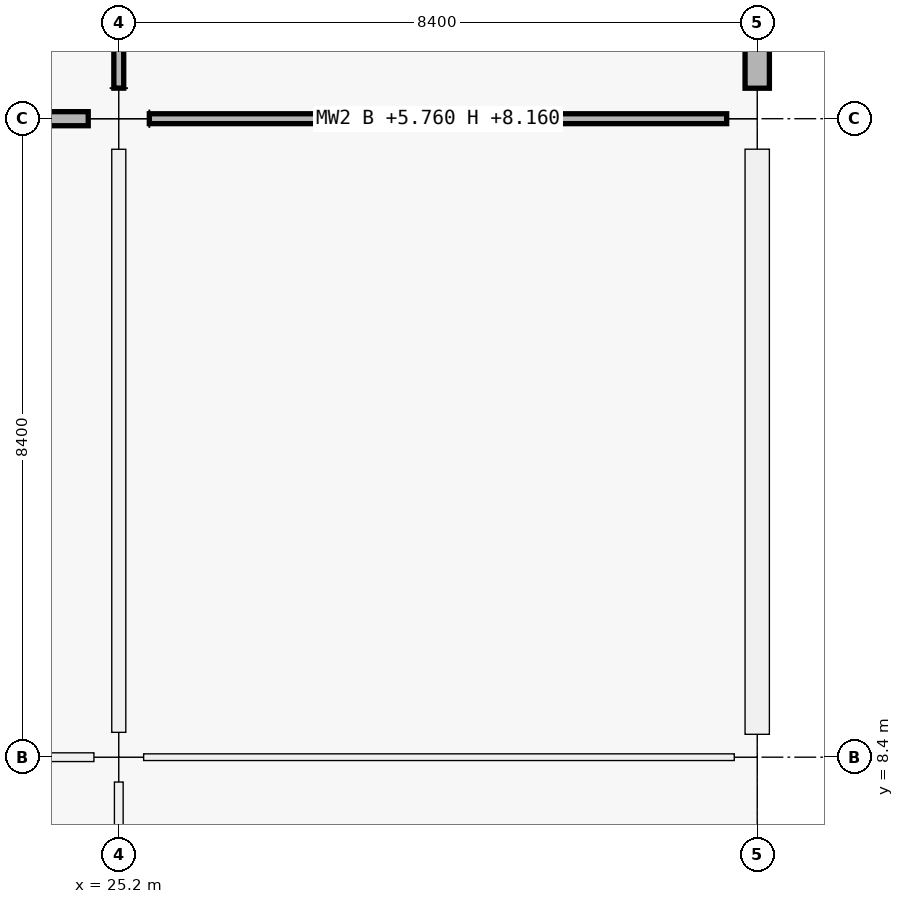
"""IFC4 building model, lengths in metres.
Left out: names, types, materials, properties, quantities, classifications, styles, units other than length and angle.
Written with IfcOpenShell. Run it as: python <this file> out.ifc"""

import sys

from ifc_helpers import new_model, si_unit, direction, frame, frame_2d, origin, origin_2d, place, context, subcontext, project, spatial, rectangle, extrude, element, fill, save


model = new_model("IFC4")
c1 = context("Model", 3, precision=1e-05, world=origin(), true_north=direction((0.0, 1.0)))
c2 = subcontext(c1, "Body", "Model", "MODEL_VIEW")
j1 = project(units=[si_unit("LENGTHUNIT", "METRE"), si_unit("PLANEANGLEUNIT", "RADIAN")], contexts=[c1])
p1 = place(None, origin())
s1 = spatial("IfcSite", under=j1, at=p1, CompositionType="ELEMENT")
p2 = place(p1, origin())
s2 = spatial("IfcBuilding", under=s1, at=p2, CompositionType="ELEMENT")
p3 = place(p2, frame((0.0, 0.0, 5.76)))
s3 = spatial("IfcBuildingStorey", under=s2, at=p3, CompositionType="ELEMENT", Elevation=5.76)
p4 = place(p3, frame((25.2, 8.4, 0.0), z_axis=(0.0, 0.0, 1.0), x_axis=(1.0, 0.0, 0.0)))
e1 = element("IfcColumn", 1, at=p4, inside=s3, PredefinedType="COLUMN", context=c2, shape_type="SweptSolid", body=[
    extrude(rectangle(XDim=0.65, YDim=0.65, at=origin_2d()), origin(), (0.0, 0.0, 1.0), 4.5),
])
p5 = place(p3, frame((25.2, 16.8, 0.0), z_axis=(0.0, 0.0, 1.0), x_axis=(1.0, 0.0, 0.0)))
e2 = element("IfcColumn", 2, at=p5, inside=s3, PredefinedType="COLUMN", context=c2, shape_type="SweptSolid", body=[
    extrude(rectangle(XDim=0.8, YDim=0.8, at=origin_2d()), origin(), (0.0, 0.0, 1.0), 4.5),
])
p6 = place(p3, frame((33.6, 8.4, 0.0), z_axis=(0.0, 0.0, 1.0), x_axis=(1.0, 0.0, 0.0)))
e3 = element("IfcColumn", 3, at=p6, inside=s3, PredefinedType="COLUMN", context=c2, shape_type="SweptSolid", body=[
    extrude(rectangle(XDim=0.6, YDim=0.6, at=origin_2d()), origin(), (0.0, 0.0, 1.0), 4.5),
])
p7 = place(p3, frame((33.6, 16.8, 0.0), z_axis=(0.0, 0.0, 1.0), x_axis=(1.0, 0.0, 0.0)))
e4 = element("IfcColumn", 4, at=p7, inside=s3, PredefinedType="COLUMN", context=c2, shape_type="SweptSolid", body=[
    extrude(rectangle(XDim=0.8, YDim=0.8, at=origin_2d()), origin(), (0.0, 0.0, 1.0), 4.5),
])
p8 = place(p3, frame((33.6, 16.399, 0.0), z_axis=(0.0, 0.0, 1.0), x_axis=(0.0, -1.0, 0.0)))
e5 = element("IfcWall", 5, at=p8, inside=s3, PredefinedType="SOLIDWALL", context=c2, shape_type="SweptSolid", body=[
    extrude(rectangle(XDim=7.698, YDim=0.32, at=frame_2d((3.849, 0.0))), origin(), (0.0, 0.0, 1.0), 3.4),
])
p9 = place(p8, frame((2.699, 0.0, 0.9)))
e6 = element("IfcOpeningElement", 6, at=p9, cuts=e5, PredefinedType="OPENING", context=c2, shape_type="SweptSolid", body=[
    extrude(rectangle(XDim=2.3, YDim=1.85, at=frame_2d((1.15, 0.925))), frame((0.0, 0.16, 0.0), z_axis=(0.0, -1.0, 0.0), x_axis=(1.0, 0.0, 0.0)), (0.0, 0.0, 1.0), 0.32),
])
p10 = place(p3, frame((33.6, 24.799, 0.0), z_axis=(0.0, 0.0, 1.0), x_axis=(0.0, -1.0, 0.0)))
e7 = element("IfcWall", 7, at=p10, inside=s3, PredefinedType="SOLIDWALL", context=c2, shape_type="SweptSolid", body=[
    extrude(rectangle(XDim=7.598, YDim=0.32, at=frame_2d((3.799, 0.0))), origin(), (0.0, 0.0, 1.0), 3.4),
])
p11 = place(p10, frame((2.349, 0.0, 0.9)))
e8 = element("IfcOpeningElement", 8, at=p11, cuts=e7, PredefinedType="OPENING", context=c2, shape_type="SweptSolid", body=[
    extrude(rectangle(XDim=2.9, YDim=1.85, at=frame_2d((1.45, 0.925))), frame((0.0, 0.16, 0.0), z_axis=(0.0, -1.0, 0.0), x_axis=(1.0, 0.0, 0.0)), (0.0, 0.0, 1.0), 0.32),
])
p12 = place(p3, frame((17.102, 8.4, 0.0), z_axis=(0.0, 0.0, 1.0), x_axis=(1.0, 0.0, 0.0)))
e9 = element("IfcWall", 9, at=p12, inside=s3, PredefinedType="PARTITIONING", context=c2, shape_type="SweptSolid", body=[
    extrude(rectangle(XDim=7.771, YDim=0.115, at=frame_2d((3.885, 0.0))), origin(), (0.0, 0.0, 1.0), 2.4),
])
p13 = place(p12, frame((3.361, 0.0, 0.0)))
e10 = element("IfcOpeningElement", 10, at=p13, cuts=e9, PredefinedType="OPENING", context=c2, shape_type="SweptSolid", body=[
    extrude(rectangle(XDim=1.05, YDim=2.12, at=frame_2d((0.525, 1.06))), frame((0.0, 0.058, 0.0), z_axis=(0.0, -1.0, 0.0), x_axis=(1.0, 0.0, 0.0)), (0.0, 0.0, 1.0), 0.115),
])
p14 = place(p3, frame((17.202, 16.8, 0.0), z_axis=(0.0, 0.0, 1.0), x_axis=(1.0, 0.0, 0.0)))
e11 = element("IfcWall", 11, at=p14, inside=s3, PredefinedType="PARTITIONING", context=c2, shape_type="SweptSolid", body=[
    extrude(rectangle(XDim=7.596, YDim=0.185, at=frame_2d((3.798, 0.0))), origin(), (0.0, 0.0, 1.0), 2.4),
])
p15 = place(p14, frame((3.268, 0.0, 0.0)))
e12 = element("IfcOpeningElement", 12, at=p15, cuts=e11, PredefinedType="OPENING", context=c2, shape_type="SweptSolid", body=[
    extrude(rectangle(XDim=1.06, YDim=2.22, at=frame_2d((0.53, 1.11))), frame((0.0, 0.093, 0.0), z_axis=(0.0, -1.0, 0.0), x_axis=(1.0, 0.0, 0.0)), (0.0, 0.0, 1.0), 0.185),
])
p16 = place(p3, frame((25.527, 8.4, 0.0), z_axis=(0.0, 0.0, 1.0), x_axis=(1.0, 0.0, 0.0)))
e13 = element("IfcWall", 13, at=p16, inside=s3, PredefinedType="PARTITIONING", context=c2, shape_type="SweptSolid", body=[
    extrude(rectangle(XDim=7.771, YDim=0.088, at=frame_2d((3.885, 0.0))), origin(), (0.0, 0.0, 1.0), 2.4),
])
p17 = place(p16, frame((3.381, 0.0, 0.0)))
e14 = element("IfcOpeningElement", 14, at=p17, cuts=e13, PredefinedType="OPENING", context=c2, shape_type="SweptSolid", body=[
    extrude(rectangle(XDim=1.01, YDim=2.12, at=frame_2d((0.505, 1.06))), frame((0.0, 0.044, 0.0), z_axis=(0.0, -1.0, 0.0), x_axis=(1.0, 0.0, 0.0)), (0.0, 0.0, 1.0), 0.088),
])
p18 = place(p3, frame((25.602, 16.8, 0.0), z_axis=(0.0, 0.0, 1.0), x_axis=(1.0, 0.0, 0.0)))
e15 = element("IfcWall", 15, at=p18, inside=s3, PredefinedType="MOVABLE", context=c2, shape_type="SweptSolid", body=[
    extrude(rectangle(XDim=7.596, YDim=0.13, at=frame_2d((3.798, 0.0))), origin(), (0.0, 0.0, 1.0), 2.4),
])
p19 = place(p18, frame((3.313, 0.0, 0.0)))
e16 = element("IfcOpeningElement", 16, at=p19, cuts=e15, PredefinedType="OPENING", context=c2, shape_type="SweptSolid", body=[
    extrude(rectangle(XDim=0.97, YDim=2.12, at=frame_2d((0.485, 1.06))), frame((0.0, 0.065, 0.0), z_axis=(0.0, -1.0, 0.0), x_axis=(1.0, 0.0, 0.0)), (0.0, 0.0, 1.0), 0.13),
])
p20 = place(p3, frame((25.2, 0.277, 0.0), z_axis=(0.0, 0.0, 1.0), x_axis=(0.0, 1.0, 0.0)))
e17 = element("IfcWall", 17, at=p20, inside=s3, PredefinedType="PARTITIONING", context=c2, shape_type="SweptSolid", body=[
    extrude(rectangle(XDim=7.796, YDim=0.115, at=frame_2d((3.898, 0.0))), origin(), (0.0, 0.0, 1.0), 2.4),
])
p21 = place(p20, frame((3.358, 0.0, 0.0)))
e18 = element("IfcOpeningElement", 18, at=p21, cuts=e17, PredefinedType="OPENING", context=c2, shape_type="SweptSolid", body=[
    extrude(rectangle(XDim=1.08, YDim=2.22, at=frame_2d((0.54, 1.11))), frame((0.0, 0.058, 0.0), z_axis=(0.0, -1.0, 0.0), x_axis=(1.0, 0.0, 0.0)), (0.0, 0.0, 1.0), 0.115),
])
p22 = place(p3, frame((25.2, 8.727, 0.0), z_axis=(0.0, 0.0, 1.0), x_axis=(0.0, 1.0, 0.0)))
e19 = element("IfcWall", 19, at=p22, inside=s3, PredefinedType="PARTITIONING", context=c2, shape_type="SweptSolid", body=[
    extrude(rectangle(XDim=7.671, YDim=0.185, at=frame_2d((3.835, 0.0))), origin(), (0.0, 0.0, 1.0), 2.4),
])
p23 = place(p22, frame((3.306, 0.0, 0.0)))
e20 = element("IfcOpeningElement", 20, at=p23, cuts=e19, PredefinedType="OPENING", context=c2, shape_type="SweptSolid", body=[
    extrude(rectangle(XDim=1.06, YDim=2.22, at=frame_2d((0.53, 1.11))), frame((0.0, 0.093, 0.0), z_axis=(0.0, -1.0, 0.0), x_axis=(1.0, 0.0, 0.0)), (0.0, 0.0, 1.0), 0.185),
])
p24 = place(p3, frame((25.2, 17.202, 0.0), z_axis=(0.0, 0.0, 1.0), x_axis=(0.0, 1.0, 0.0)))
e21 = element("IfcWall", 21, at=p24, inside=s3, PredefinedType="MOVABLE", context=c2, shape_type="SweptSolid", body=[
    extrude(rectangle(XDim=7.596, YDim=0.13, at=frame_2d((3.798, 0.0))), origin(), (0.0, 0.0, 1.0), 2.4),
])
p25 = place(p24, frame((3.278, 0.0, 0.0)))
e22 = element("IfcOpeningElement", 22, at=p25, cuts=e21, PredefinedType="OPENING", context=c2, shape_type="SweptSolid", body=[
    extrude(rectangle(XDim=1.04, YDim=2.2, at=frame_2d((0.52, 1.1))), frame((0.0, 0.065, 0.0), z_axis=(0.0, -1.0, 0.0), x_axis=(1.0, 0.0, 0.0)), (0.0, 0.0, 1.0), 0.13),
])
p26 = place(p9, origin())
e23 = element("IfcWindow", 23, at=p26, inside=s3, PartitioningType="SINGLE_PANEL", PredefinedType="WINDOW", context=c2, shape_type="SweptSolid", body=[
    extrude(rectangle(XDim=2.3, YDim=1.85, at=frame_2d((1.15, 0.925))), frame((0.0, 0.03, 0.0), z_axis=(0.0, -1.0, 0.0), x_axis=(1.0, 0.0, 0.0)), (0.0, 0.0, 1.0), 0.06),
])
fill(e6, e23)
p27 = place(p17, origin())
e24 = element("IfcDoor", 24, at=p27, inside=s3, OperationType="SINGLE_SWING_LEFT", PredefinedType="DOOR", context=c2, shape_type="SweptSolid", body=[
    extrude(rectangle(XDim=1.01, YDim=2.12, at=frame_2d((0.505, 1.06))), frame((0.0, 0.025, 0.0), z_axis=(0.0, -1.0, 0.0), x_axis=(1.0, 0.0, 0.0)), (0.0, 0.0, 1.0), 0.05),
])
fill(e14, e24)
p28 = place(p19, origin())
e25 = element("IfcDoor", 25, at=p28, inside=s3, OperationType="SINGLE_SWING_RIGHT", PredefinedType="DOOR", context=c2, shape_type="SweptSolid", body=[
    extrude(rectangle(XDim=0.97, YDim=2.12, at=frame_2d((0.485, 1.06))), frame((0.0, 0.025, 0.0), z_axis=(0.0, -1.0, 0.0), x_axis=(1.0, 0.0, 0.0)), (0.0, 0.0, 1.0), 0.05),
])
fill(e16, e25)
p29 = place(p23, origin())
e26 = element("IfcDoor", 26, at=p29, inside=s3, OperationType="SINGLE_SWING_LEFT", PredefinedType="DOOR", context=c2, shape_type="SweptSolid", body=[
    extrude(rectangle(XDim=1.06, YDim=2.22, at=frame_2d((0.53, 1.11))), frame((0.0, 0.025, 0.0), z_axis=(0.0, -1.0, 0.0), x_axis=(1.0, 0.0, 0.0)), (0.0, 0.0, 1.0), 0.05),
])
fill(e20, e26)
save(model, sys.argv[1])
